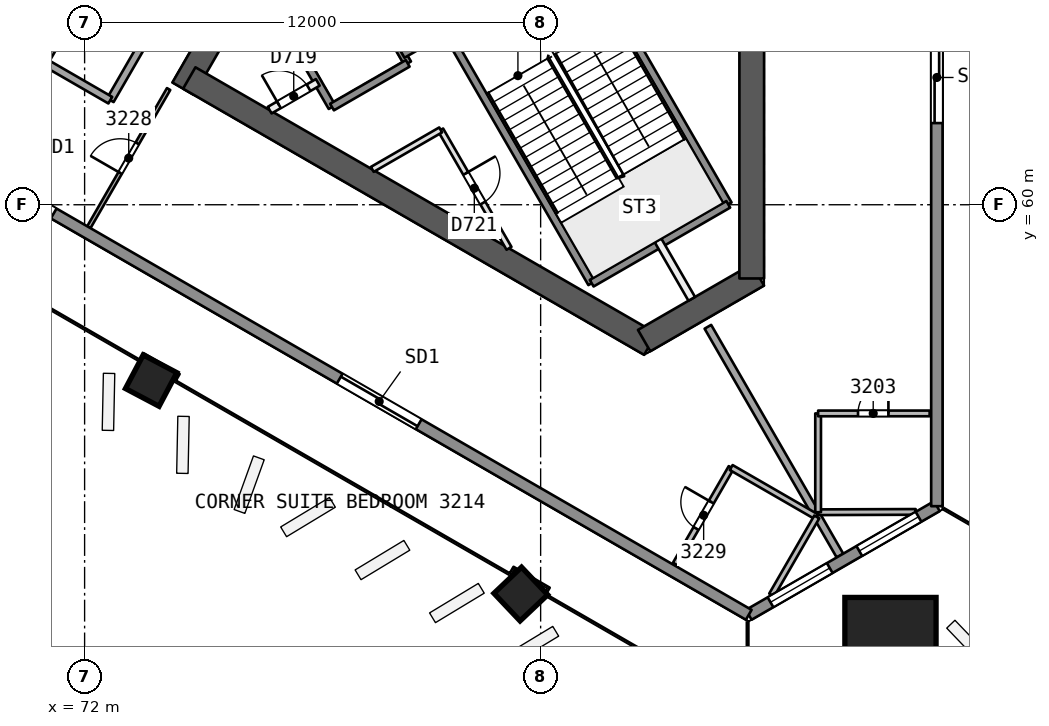
"""IFC4 building model, lengths in metres.
Left out: names, types, materials, properties, quantities, classifications, styles, units other than length and angle.
Written with IfcOpenShell. Run it as: python <this file> out.ifc"""

import sys

from ifc_helpers import new_model, si_unit, direction, frame, frame_2d, origin, origin_2d, place, context, subcontext, project, spatial, rectangle, extrude, element, fill, save


model = new_model("IFC4")
c1 = context("Model", 3, precision=1e-05, world=origin(), true_north=direction((0.0, 1.0)))
c2 = subcontext(c1, "Body", "Model", "MODEL_VIEW")
j1 = project(units=[si_unit("LENGTHUNIT", "METRE"), si_unit("PLANEANGLEUNIT", "RADIAN")], contexts=[c1])
p1 = place(None, origin())
s1 = spatial("IfcSite", under=j1, at=p1, CompositionType="ELEMENT")
p2 = place(p1, origin())
s2 = spatial("IfcBuilding", under=s1, at=p2, CompositionType="ELEMENT")
p3 = place(p2, frame((0.0, 0.0, 132.7)))
s3 = spatial("IfcBuildingStorey", under=s2, at=p3, CompositionType="ELEMENT", Elevation=132.7)
p4 = place(p3, frame((79.688, 71.881, 0.0), z_axis=(0.0, 0.0, 1.0), x_axis=(-0.49999822179, -0.866026430432, 0.0)))
e1 = element("IfcWall", 1, at=p4, inside=s3, PredefinedType="SHEAR", context=c2, shape_type="SweptSolid", body=[
    extrude(rectangle(XDim=10.192, YDim=0.65, at=frame_2d((5.096, 0.0))), origin(), (0.0, 0.0, 1.0), 3.7),
])
p5 = place(p4, frame((0.762, 0.0, 0.0)))
e2 = element("IfcOpeningElement", 2, at=p5, cuts=e1, PredefinedType="OPENING", context=c2, shape_type="SweptSolid", body=[
    extrude(rectangle(XDim=1.2, YDim=2.1, at=frame_2d((0.6, 1.05))), frame((0.0, 0.335, 0.0), z_axis=(0.0, -1.0, 0.0), x_axis=(1.0, 0.0, 0.0)), (0.0, 0.0, 1.0), 0.671),
])
p6 = place(p3, frame((74.754, 63.335, 0.0), z_axis=(0.0, 0.0, 1.0), x_axis=(0.866026250715, -0.49999853307, 0.0)))
e3 = element("IfcWall", 3, at=p6, inside=s3, PredefinedType="SHEAR", context=c2, shape_type="SweptSolid", body=[
    extrude(rectangle(XDim=14.008, YDim=0.65, at=frame_2d((7.004, 0.0))), origin(), (0.0, 0.0, 1.0), 3.7),
])
p7 = place(p3, frame((86.723, 56.425, 0.0), z_axis=(0.0, 0.0, 1.0), x_axis=(0.866031550877, 0.499989352773, 0.0)))
e4 = element("IfcWall", 4, at=p7, inside=s3, PredefinedType="SHEAR", context=c2, shape_type="SweptSolid", body=[
    extrude(rectangle(XDim=3.458, YDim=0.65, at=frame_2d((1.729, 0.0))), origin(), (0.0, 0.0, 1.0), 3.7),
])
p8 = place(p3, frame((89.555, 58.06, 0.0), z_axis=(0.0, 0.0, 1.0), x_axis=(0.0, 1.0, 0.0)))
e5 = element("IfcWall", 5, at=p8, inside=s3, PredefinedType="SHEAR", context=c2, shape_type="SweptSolid", body=[
    extrude(rectangle(XDim=14.146, YDim=0.65, at=frame_2d((7.073, 0.0))), origin(), (0.0, 0.0, 1.0), 3.7),
])
p9 = place(p3, frame((73.75, 55.345, 0.0), z_axis=(0.000857578916, 0.022824792675, 0.999739112668), x_axis=(-0.499949204908, -0.865819211891, 0.020196158824)))
e6 = element("IfcColumn", 6, at=p9, inside=s3, PredefinedType="COLUMN", context=c2, shape_type="SweptSolid", body=[
    extrude(rectangle(XDim=1.0, YDim=1.0, at=origin_2d()), origin(), (0.0, 0.0, 1.0), 3.701),
])
p10 = place(p3, frame((83.488, 49.723, 0.0), z_axis=(-0.008376454378, 0.028163354484, 0.999568237028), x_axis=(-0.500239696169, -0.865651362756, 0.020198132002)))
e7 = element("IfcColumn", 7, at=p10, inside=s3, PredefinedType="COLUMN", context=c2, shape_type="SweptSolid", body=[
    extrude(rectangle(XDim=1.0, YDim=1.0, at=origin_2d()), origin(), (0.0, 0.0, 1.0), 3.702),
])
p11 = place(p3, frame((93.227, 48.431, 0.0), z_axis=(-0.017607001884, 0.030531992032, 0.999378702468), x_axis=(0.4992500341, -0.865740835585, 0.035244986208)))
e8 = element("IfcColumn", 8, at=p11, inside=s3, PredefinedType="COLUMN", context=c2, shape_type="SweptSolid", body=[
    extrude(rectangle(XDim=2.4, YDim=2.4, at=origin_2d()), origin(), (0.0, 0.0, 1.0), 3.702),
])
p12 = place(p3, frame((93.868, 51.918, 0.0), z_axis=(0.0, 0.0, 1.0), x_axis=(-0.999994138143, -0.003423986016, 0.0)))
e9 = element("IfcWall", 9, at=p12, inside=s3, PredefinedType="PARTITIONING", context=c2, shape_type="SweptSolid", body=[
    extrude(rectangle(XDim=2.567, YDim=0.15, at=frame_2d((1.283, 0.0))), origin(), (0.0, 0.0, 1.0), 3.25),
])
p13 = place(p3, frame((91.302, 51.909, 0.0), z_axis=(0.0, 0.0, 1.0), x_axis=(0.0, 1.0, 0.0)))
e10 = element("IfcWall", 10, at=p13, inside=s3, PredefinedType="PARTITIONING", context=c2, shape_type="SweptSolid", body=[
    extrude(rectangle(XDim=2.6, YDim=0.15, at=frame_2d((1.3, 0.0))), origin(), (0.0, 0.0, 1.0), 3.25),
])
p14 = place(p3, frame((91.302, 54.509, 0.0), z_axis=(0.0, 0.0, 1.0), x_axis=(1.0, 0.0, 0.0)))
e11 = element("IfcWall", 11, at=p14, inside=s3, PredefinedType="PARTITIONING", context=c2, shape_type="SweptSolid", body=[
    extrude(rectangle(XDim=2.935, YDim=0.15, at=frame_2d((1.468, 0.0))), origin(), (0.0, 0.0, 1.0), 3.25),
])
p15 = place(p14, frame((1.05, 0.0, 0.0)))
e12 = element("IfcOpeningElement", 12, at=p15, cuts=e11, PredefinedType="OPENING", context=c2, shape_type="SweptSolid", body=[
    extrude(rectangle(XDim=0.8, YDim=2.1, at=frame_2d((0.4, 1.05))), frame((0.0, 0.085, 0.0), z_axis=(0.0, -1.0, 0.0), x_axis=(1.0, 0.0, 0.0)), (0.0, 0.0, 1.0), 0.171),
])
p16 = place(p3, frame((88.401, 56.789, 0.0), z_axis=(0.0, 0.0, 1.0), x_axis=(0.499972739829, -0.866041141879, 0.0)))
e13 = element("IfcWall", 13, at=p16, inside=s3, PredefinedType="PARTITIONING", context=c2, shape_type="SweptSolid", body=[
    extrude(rectangle(XDim=6.952, YDim=0.2, at=frame_2d((3.476, 0.0))), origin(), (0.0, 0.0, 1.0), 3.25),
])
p17 = place(p3, frame((68.331, 61.59, 0.0), z_axis=(0.0, 0.0, 1.0), x_axis=(0.499987977232, 0.866032345022, 0.0)))
e14 = element("IfcWall", 14, at=p17, inside=s3, PredefinedType="PARTITIONING", context=c2, shape_type="SweptSolid", body=[
    extrude(rectangle(XDim=12.177, YDim=0.2, at=frame_2d((6.089, 0.0))), origin(), (0.0, 0.0, 1.0), 3.25),
])
p18 = place(p3, frame((72.111, 59.408, 0.0), z_axis=(0.0, 0.0, 1.0), x_axis=(0.49999760543, 0.866026786286, 0.0)))
e15 = element("IfcWall", 15, at=p18, inside=s3, PredefinedType="PARTITIONING", context=c2, shape_type="SweptSolid", body=[
    extrude(rectangle(XDim=4.199, YDim=0.1, at=frame_2d((2.099, 0.0))), origin(), (0.0, 0.0, 1.0), 3.25),
])
p19 = place(p18, frame((1.649, 0.0, 0.0)))
e16 = element("IfcOpeningElement", 16, at=p19, cuts=e15, PredefinedType="OPENING", context=c2, shape_type="SweptSolid", body=[
    extrude(rectangle(XDim=0.9, YDim=2.1, at=frame_2d((0.45, 1.05))), frame((0.0, 0.061, 0.0), z_axis=(0.0, -1.0, 0.0), x_axis=(1.0, 0.0, 0.0)), (0.0, 0.0, 1.0), 0.121),
])
p20 = place(p3, frame((77.176, 70.545, 0.0), z_axis=(0.0, 0.0, 1.0), x_axis=(-0.499990139034, -0.866031096941, 0.0)))
e17 = element("IfcWall", 17, at=p20, inside=s3, PredefinedType="PARTITIONING", context=c2, shape_type="SweptSolid", body=[
    extrude(rectangle(XDim=9.0, YDim=0.2, at=frame_2d((4.5, 0.0))), origin(), (0.0, 0.0, 1.0), 3.25),
])
p21 = place(p20, frame((4.05, 0.0, 0.0)))
e18 = element("IfcOpeningElement", 18, at=p21, cuts=e17, PredefinedType="OPENING", context=c2, shape_type="SweptSolid", body=[
    extrude(rectangle(XDim=0.9, YDim=2.1, at=frame_2d((0.45, 1.05))), frame((0.0, 0.11, 0.0), z_axis=(0.0, -1.0, 0.0), x_axis=(1.0, 0.0, 0.0)), (0.0, 0.0, 1.0), 0.221),
])
p22 = place(p3, frame((72.676, 62.751, 0.0), z_axis=(0.0, 0.0, 1.0), x_axis=(-0.866010750942, 0.50002537861, 0.0)))
e19 = element("IfcWall", 19, at=p22, inside=s3, PredefinedType="PARTITIONING", context=c2, shape_type="SweptSolid", body=[
    extrude(rectangle(XDim=2.0, YDim=0.2, at=frame_2d((1.0, 0.0))), origin(), (0.0, 0.0, 1.0), 3.25),
])
p23 = place(p3, frame((70.944, 63.751, 0.0), z_axis=(0.0, 0.0, 1.0), x_axis=(0.499990139034, 0.866031096941, 0.0)))
e20 = element("IfcWall", 20, at=p23, inside=s3, PredefinedType="PARTITIONING", context=c2, shape_type="SweptSolid", body=[
    extrude(rectangle(XDim=9.0, YDim=0.2, at=frame_2d((4.5, 0.0))), origin(), (0.0, 0.0, 1.0), 3.25),
])
p24 = place(p3, frame((87.547, 50.543, 0.0), z_axis=(0.0, 0.0, 1.0), x_axis=(0.499976855651, 0.866038765768, 0.0)))
e21 = element("IfcWall", 21, at=p24, inside=s3, PredefinedType="PARTITIONING", context=c2, shape_type="SweptSolid", body=[
    extrude(rectangle(XDim=2.935, YDim=0.15, at=frame_2d((1.468, 0.0))), origin(), (0.0, 0.0, 1.0), 3.25),
])
p25 = place(p24, frame((1.085, 0.0, 0.0)))
e22 = element("IfcOpeningElement", 22, at=p25, cuts=e21, PredefinedType="OPENING", context=c2, shape_type="SweptSolid", body=[
    extrude(rectangle(XDim=0.8, YDim=2.1, at=frame_2d((0.4, 1.05))), frame((0.0, 0.085, 0.0), z_axis=(0.0, -1.0, 0.0), x_axis=(1.0, 0.0, 0.0)), (0.0, 0.0, 1.0), 0.171),
])
p26 = place(p3, frame((89.014, 53.085, 0.0), z_axis=(0.0, 0.0, 1.0), x_axis=(0.866021400173, -0.500006934395, 0.0)))
e23 = element("IfcWall", 23, at=p26, inside=s3, PredefinedType="PARTITIONING", context=c2, shape_type="SweptSolid", body=[
    extrude(rectangle(XDim=2.6, YDim=0.15, at=frame_2d((1.3, 0.0))), origin(), (0.0, 0.0, 1.0), 3.25),
])
p27 = place(p3, frame((91.266, 51.785, 0.0), z_axis=(0.0, 0.0, 1.0), x_axis=(-0.49995699919, -0.866050228891, 0.0)))
e24 = element("IfcWall", 24, at=p27, inside=s3, PredefinedType="PARTITIONING", context=c2, shape_type="SweptSolid", body=[
    extrude(rectangle(XDim=2.373, YDim=0.15, at=frame_2d((1.187, 0.0))), origin(), (0.0, 0.0, 1.0), 3.25),
])
p28 = place(p3, frame((94.427, 52.068, 0.0), z_axis=(0.0, 0.0, 1.0), x_axis=(-0.866021273833, -0.500007153218, 0.0)))
e25 = element("IfcWall", 25, at=p28, inside=s3, PredefinedType="SOLIDWALL", context=c2, shape_type="SweptSolid", body=[
    extrude(rectangle(XDim=5.716, YDim=0.3, at=frame_2d((2.858, 0.0))), origin(), (0.0, 0.0, 1.0), 3.25),
])
p29 = place(p28, frame((0.557, 0.0, 0.9)))
e26 = element("IfcOpeningElement", 26, at=p29, cuts=e25, PredefinedType="OPENING", context=c2, shape_type="SweptSolid", body=[
    extrude(rectangle(XDim=1.8, YDim=1.5, at=frame_2d((0.9, 0.75))), frame((0.0, 0.161, 0.0), z_axis=(0.0, -1.0, 0.0), x_axis=(1.0, 0.0, 0.0)), (0.0, 0.0, 1.0), 0.321),
])
p30 = place(p28, frame((3.255, 0.0, 0.9)))
e27 = element("IfcOpeningElement", 27, at=p30, cuts=e25, PredefinedType="OPENING", context=c2, shape_type="SweptSolid", body=[
    extrude(rectangle(XDim=1.8, YDim=1.5, at=frame_2d((0.9, 0.75))), frame((0.0, 0.161, 0.0), z_axis=(0.0, -1.0, 0.0), x_axis=(1.0, 0.0, 0.0)), (0.0, 0.0, 1.0), 0.321),
])
p31 = place(p3, frame((94.427, 107.932, 0.0), z_axis=(0.0, 0.0, 1.0), x_axis=(0.0, -1.0, 0.0)))
e28 = element("IfcWall", 28, at=p31, inside=s3, PredefinedType="SOLIDWALL", context=c2, shape_type="SweptSolid", body=[
    extrude(rectangle(XDim=55.864, YDim=0.3, at=frame_2d((27.932, 0.0))), origin(), (0.0, 0.0, 1.0), 3.25),
])
p32 = place(p31, frame((31.72, 0.0, 0.0)))
e29 = element("IfcOpeningElement", 29, at=p32, cuts=e28, PredefinedType="OPENING", context=c2, shape_type="SweptSolid", body=[
    extrude(rectangle(XDim=2.4, YDim=2.4, at=frame_2d((1.2, 1.2))), frame((0.0, 0.161, 0.0), z_axis=(0.0, -1.0, 0.0), x_axis=(1.0, 0.0, 0.0)), (0.0, 0.0, 1.0), 0.321),
])
p33 = place(p31, frame((43.384, 0.0, 0.0)))
e30 = element("IfcOpeningElement", 30, at=p33, cuts=e28, PredefinedType="OPENING", context=c2, shape_type="SweptSolid", body=[
    extrude(rectangle(XDim=2.4, YDim=2.4, at=frame_2d((1.2, 1.2))), frame((0.0, 0.161, 0.0), z_axis=(0.0, -1.0, 0.0), x_axis=(1.0, 0.0, 0.0)), (0.0, 0.0, 1.0), 0.321),
])
p34 = place(p31, frame((21.9, 0.0, 0.0)))
e31 = element("IfcOpeningElement", 31, at=p34, cuts=e28, PredefinedType="OPENING", context=c2, shape_type="SweptSolid", body=[
    extrude(rectangle(XDim=2.4, YDim=2.4, at=frame_2d((1.2, 1.2))), frame((0.0, 0.161, 0.0), z_axis=(0.0, -1.0, 0.0), x_axis=(1.0, 0.0, 0.0)), (0.0, 0.0, 1.0), 0.321),
])
p35 = place(p31, frame((10.029, 0.0, 0.0)))
e32 = element("IfcOpeningElement", 32, at=p35, cuts=e28, PredefinedType="OPENING", context=c2, shape_type="SweptSolid", body=[
    extrude(rectangle(XDim=2.4, YDim=2.4, at=frame_2d((1.2, 1.2))), frame((0.0, 0.161, 0.0), z_axis=(0.0, -1.0, 0.0), x_axis=(1.0, 0.0, 0.0)), (0.0, 0.0, 1.0), 0.321),
])
p36 = place(p31, frame((26.888, 0.0, 0.0)))
e33 = element("IfcOpeningElement", 33, at=p36, cuts=e28, PredefinedType="OPENING", context=c2, shape_type="SweptSolid", body=[
    extrude(rectangle(XDim=2.4, YDim=2.4, at=frame_2d((1.2, 1.2))), frame((0.0, 0.161, 0.0), z_axis=(0.0, -1.0, 0.0), x_axis=(1.0, 0.0, 0.0)), (0.0, 0.0, 1.0), 0.321),
])
p37 = place(p3, frame((89.477, 49.21, 0.0), z_axis=(0.0, 0.0, 1.0), x_axis=(-0.866026276916, 0.499998487688, 0.0)))
e34 = element("IfcWall", 34, at=p37, inside=s3, PredefinedType="SOLIDWALL", context=c2, shape_type="SweptSolid", body=[
    extrude(rectangle(XDim=55.864, YDim=0.3, at=frame_2d((27.932, 0.0))), origin(), (0.0, 0.0, 1.0), 3.25),
])
p38 = place(p37, frame((26.888, 0.0, 0.0)))
e35 = element("IfcOpeningElement", 35, at=p38, cuts=e34, PredefinedType="OPENING", context=c2, shape_type="SweptSolid", body=[
    extrude(rectangle(XDim=2.4, YDim=2.4, at=frame_2d((1.2, 1.2))), frame((0.0, 0.161, 0.0), z_axis=(0.0, -1.0, 0.0), x_axis=(1.0, 0.0, 0.0)), (0.0, 0.0, 1.0), 0.321),
])
p39 = place(p37, frame((32.5, 0.0, 0.0)))
e36 = element("IfcOpeningElement", 36, at=p39, cuts=e34, PredefinedType="OPENING", context=c2, shape_type="SweptSolid", body=[
    extrude(rectangle(XDim=2.4, YDim=2.4, at=frame_2d((1.2, 1.2))), frame((0.0, 0.161, 0.0), z_axis=(0.0, -1.0, 0.0), x_axis=(1.0, 0.0, 0.0)), (0.0, 0.0, 1.0), 0.321),
])
p40 = place(p37, frame((43.384, 0.0, 0.0)))
e37 = element("IfcOpeningElement", 37, at=p40, cuts=e34, PredefinedType="OPENING", context=c2, shape_type="SweptSolid", body=[
    extrude(rectangle(XDim=2.4, YDim=2.4, at=frame_2d((1.2, 1.2))), frame((0.0, 0.161, 0.0), z_axis=(0.0, -1.0, 0.0), x_axis=(1.0, 0.0, 0.0)), (0.0, 0.0, 1.0), 0.321),
])
p41 = place(p37, frame((21.12, 0.0, 0.0)))
e38 = element("IfcOpeningElement", 38, at=p41, cuts=e34, PredefinedType="OPENING", context=c2, shape_type="SweptSolid", body=[
    extrude(rectangle(XDim=2.4, YDim=2.4, at=frame_2d((1.2, 1.2))), frame((0.0, 0.161, 0.0), z_axis=(0.0, -1.0, 0.0), x_axis=(1.0, 0.0, 0.0)), (0.0, 0.0, 1.0), 0.321),
])
p42 = place(p37, frame((10.029, 0.0, 0.0)))
e39 = element("IfcOpeningElement", 39, at=p42, cuts=e34, PredefinedType="OPENING", context=c2, shape_type="SweptSolid", body=[
    extrude(rectangle(XDim=2.4, YDim=2.4, at=frame_2d((1.2, 1.2))), frame((0.0, 0.161, 0.0), z_axis=(0.0, -1.0, 0.0), x_axis=(1.0, 0.0, 0.0)), (0.0, 0.0, 1.0), 0.321),
])
p43 = place(p3, frame((77.135, 64.952, 0.0), z_axis=(0.0, 0.0, 1.0), x_axis=(0.499996545922, -0.866027397988, 0.0)))
e40 = element("IfcWall", 40, at=p43, inside=s3, PredefinedType="SOLIDWALL", context=c2, shape_type="SweptSolid", body=[
    extrude(rectangle(XDim=2.75, YDim=0.2, at=frame_2d((1.375, 0.0))), origin(), (0.0, 0.0, 1.0), 3.25),
])
p44 = place(p3, frame((81.369, 61.969, 0.0), z_axis=(0.0, 0.0, 1.0), x_axis=(0.499992664208, -0.866029639064, 0.0)))
e41 = element("IfcWall", 41, at=p44, inside=s3, PredefinedType="PARTITIONING", context=c2, shape_type="SweptSolid", body=[
    extrude(rectangle(XDim=3.598, YDim=0.15, at=frame_2d((1.799, 0.0))), origin(), (0.0, 0.0, 1.0), 3.25),
])
p45 = place(p44, frame((1.322, 0.0, 0.0)))
e42 = element("IfcOpeningElement", 42, at=p45, cuts=e41, PredefinedType="OPENING", context=c2, shape_type="SweptSolid", body=[
    extrude(rectangle(XDim=0.9, YDim=2.1, at=frame_2d((0.45, 1.05))), frame((0.0, 0.085, 0.0), z_axis=(0.0, -1.0, 0.0), x_axis=(1.0, 0.0, 0.0)), (0.0, 0.0, 1.0), 0.171),
])
p46 = place(p3, frame((79.127, 66.102, 0.0), z_axis=(0.0, 0.0, 1.0), x_axis=(0.499996545922, -0.866027397988, 0.0)))
e43 = element("IfcWall", 43, at=p46, inside=s3, PredefinedType="SOLIDWALL", context=c2, shape_type="SweptSolid", body=[
    extrude(rectangle(XDim=2.75, YDim=0.2, at=frame_2d((1.375, 0.0))), origin(), (0.0, 0.0, 1.0), 3.25),
])
p47 = place(p3, frame((81.493, 64.604, 0.0), z_axis=(0.0, 0.0, 1.0), x_axis=(0.500006057782, -0.866021906294, 0.0)))
e44 = element("IfcWall", 44, at=p47, inside=s3, PredefinedType="SOLIDWALL", context=c2, shape_type="SweptSolid", body=[
    extrude(rectangle(XDim=7.7, YDim=0.2, at=frame_2d((3.85, 0.0))), origin(), (0.0, 0.0, 1.0), 3.25),
])
p48 = place(p3, frame((87.09, 59.06, 0.0), z_axis=(0.0, 0.0, 1.0), x_axis=(0.499944938281, -0.866057191349, 0.0)))
e45 = element("IfcWall", 45, at=p48, inside=s3, PredefinedType="PARTITIONING", context=c2, shape_type="SweptSolid", body=[
    extrude(rectangle(XDim=1.773, YDim=0.2, at=frame_2d((0.887, 0.0))), origin(), (0.0, 0.0, 1.0), 3.25),
])
p49 = place(p3, frame((85.087, 66.679, 0.0), z_axis=(0.0, 0.0, 1.0), x_axis=(0.500019787375, -0.866013979237, 0.0)))
e46 = element("IfcWall", 46, at=p49, inside=s3, PredefinedType="SOLIDWALL", context=c2, shape_type="SweptSolid", body=[
    extrude(rectangle(XDim=7.7, YDim=0.2, at=frame_2d((3.85, 0.0))), origin(), (0.0, 0.0, 1.0), 3.25),
])
p50 = place(p49, frame((0.55, 0.0, 0.0)))
e47 = element("IfcOpeningElement", 47, at=p50, cuts=e46, PredefinedType="OPENING", context=c2, shape_type="SweptSolid", body=[
    extrude(rectangle(XDim=1.1, YDim=2.1, at=frame_2d((0.55, 1.05))), frame((0.0, 0.11, 0.0), z_axis=(0.0, -1.0, 0.0), x_axis=(1.0, 0.0, 0.0)), (0.0, 0.0, 1.0), 0.221),
])
p51 = place(p3, frame((76.87, 62.489, 0.0), z_axis=(0.0, 0.0, 1.0), x_axis=(0.866054810376, 0.49994906283, 0.0)))
e48 = element("IfcWall", 48, at=p51, inside=s3, PredefinedType="PARTITIONING", context=c2, shape_type="SweptSolid", body=[
    extrude(rectangle(XDim=1.461, YDim=0.2, at=frame_2d((0.73, 0.0))), origin(), (0.0, 0.0, 1.0), 3.25),
])
p52 = place(p51, frame((0.281, 0.0, 0.0)))
e49 = element("IfcOpeningElement", 49, at=p52, cuts=e48, PredefinedType="OPENING", context=c2, shape_type="SweptSolid", body=[
    extrude(rectangle(XDim=0.9, YDim=2.1, at=frame_2d((0.45, 1.05))), frame((0.0, 0.11, 0.0), z_axis=(0.0, -1.0, 0.0), x_axis=(1.0, 0.0, 0.0)), (0.0, 0.0, 1.0), 0.221),
])
p53 = place(p3, frame((80.367, 63.954, 0.0), z_axis=(0.0, 0.0, 1.0), x_axis=(0.866026575979, 0.499997969693, 0.0)))
e50 = element("IfcWall", 50, at=p53, inside=s3, PredefinedType="SOLIDWALL", context=c2, shape_type="SweptSolid", body=[
    extrude(rectangle(XDim=6.75, YDim=0.2, at=frame_2d((3.375, 0.0))), origin(), (0.0, 0.0, 1.0), 3.25),
])
p54 = place(p3, frame((78.51, 62.57, 0.0), z_axis=(0.0, 0.0, 1.0), x_axis=(0.866053019151, 0.499952165731, 0.0)))
e51 = element("IfcWall", 51, at=p54, inside=s3, PredefinedType="SOLIDWALL", context=c2, shape_type="SweptSolid", body=[
    extrude(rectangle(XDim=2.3, YDim=0.2, at=frame_2d((1.15, 0.0))), origin(), (0.0, 0.0, 1.0), 3.25),
])
p55 = place(p3, frame((79.57, 60.93, 0.0), z_axis=(0.0, 0.0, 1.0), x_axis=(0.866021168401, 0.500007335828, 0.0)))
e52 = element("IfcWall", 52, at=p55, inside=s3, PredefinedType="PARTITIONING", context=c2, shape_type="SweptSolid", body=[
    extrude(rectangle(XDim=2.077, YDim=0.15, at=frame_2d((1.039, 0.0))), origin(), (0.0, 0.0, 1.0), 3.25),
])
p56 = place(p3, frame((85.343, 57.935, 0.0), z_axis=(0.0, 0.0, 1.0), x_axis=(0.866004344652, 0.500036473714, 0.0)))
e53 = element("IfcWall", 53, at=p56, inside=s3, PredefinedType="SOLIDWALL", context=c2, shape_type="SweptSolid", body=[
    extrude(rectangle(XDim=4.15, YDim=0.2, at=frame_2d((2.075, 0.0))), origin(), (0.0, 0.0, 1.0), 3.25),
])
p57 = place(p15, origin())
e54 = element("IfcDoor", 54, at=p57, inside=s3, OperationType="SINGLE_SWING_RIGHT", PredefinedType="NOTDEFINED", context=c2, shape_type="SweptSolid", body=[
    extrude(rectangle(XDim=0.8, YDim=2.1, at=frame_2d((0.4, 1.05))), frame((0.0, 0.025, 0.0), z_axis=(0.0, -1.0, 0.0), x_axis=(1.0, 0.0, 0.0)), (0.0, 0.0, 1.0), 0.05),
])
fill(e12, e54)
p58 = place(p19, origin())
e55 = element("IfcDoor", 55, at=p58, inside=s3, OperationType="SINGLE_SWING_LEFT", PredefinedType="NOTDEFINED", context=c2, shape_type="SweptSolid", body=[
    extrude(rectangle(XDim=0.9, YDim=2.1, at=frame_2d((0.45, 1.05))), frame((0.0, 0.025, 0.0), z_axis=(0.0, -1.0, 0.0), x_axis=(1.0, 0.0, 0.0)), (0.0, 0.0, 1.0), 0.05),
])
fill(e16, e55)
p59 = place(p25, origin())
e56 = element("IfcDoor", 56, at=p59, inside=s3, OperationType="SINGLE_SWING_RIGHT", PredefinedType="NOTDEFINED", context=c2, shape_type="SweptSolid", body=[
    extrude(rectangle(XDim=0.8, YDim=2.1, at=frame_2d((0.4, 1.05))), frame((0.0, 0.025, 0.0), z_axis=(0.0, -1.0, 0.0), x_axis=(1.0, 0.0, 0.0)), (0.0, 0.0, 1.0), 0.05),
])
fill(e22, e56)
p60 = place(p29, origin())
e57 = element("IfcWindow", 57, at=p60, inside=s3, PartitioningType="SINGLE_PANEL", PredefinedType="WINDOW", context=c2, shape_type="SweptSolid", body=[
    extrude(rectangle(XDim=1.8, YDim=1.5, at=frame_2d((0.9, 0.75))), frame((0.0, 0.03, 0.0), z_axis=(0.0, -1.0, 0.0), x_axis=(1.0, 0.0, 0.0)), (0.0, 0.0, 1.0), 0.06),
])
fill(e26, e57)
p61 = place(p30, origin())
e58 = element("IfcWindow", 58, at=p61, inside=s3, PartitioningType="SINGLE_PANEL", PredefinedType="WINDOW", context=c2, shape_type="SweptSolid", body=[
    extrude(rectangle(XDim=1.8, YDim=1.5, at=frame_2d((0.9, 0.75))), frame((0.0, 0.03, 0.0), z_axis=(0.0, -1.0, 0.0), x_axis=(1.0, 0.0, 0.0)), (0.0, 0.0, 1.0), 0.06),
])
fill(e27, e58)
p62 = place(p33, origin())
e59 = element("IfcDoor", 59, at=p62, inside=s3, OperationType="SLIDING_TO_RIGHT", PredefinedType="NOTDEFINED", context=c2, shape_type="SweptSolid", body=[
    extrude(rectangle(XDim=2.4, YDim=2.4, at=frame_2d((1.2, 1.2))), frame((0.0, 0.025, 0.0), z_axis=(0.0, -1.0, 0.0), x_axis=(1.0, 0.0, 0.0)), (0.0, 0.0, 1.0), 0.05),
])
fill(e30, e59)
p63 = place(p41, origin())
e60 = element("IfcDoor", 60, at=p63, inside=s3, OperationType="SLIDING_TO_RIGHT", PredefinedType="NOTDEFINED", context=c2, shape_type="SweptSolid", body=[
    extrude(rectangle(XDim=2.4, YDim=2.4, at=frame_2d((1.2, 1.2))), frame((0.0, 0.025, 0.0), z_axis=(0.0, -1.0, 0.0), x_axis=(1.0, 0.0, 0.0)), (0.0, 0.0, 1.0), 0.05),
])
fill(e38, e60)
p64 = place(p42, origin())
e61 = element("IfcDoor", 61, at=p64, inside=s3, OperationType="SLIDING_TO_LEFT", PredefinedType="NOTDEFINED", context=c2, shape_type="SweptSolid", body=[
    extrude(rectangle(XDim=2.4, YDim=2.4, at=frame_2d((1.2, 1.2))), frame((0.0, 0.025, 0.0), z_axis=(0.0, -1.0, 0.0), x_axis=(1.0, 0.0, 0.0)), (0.0, 0.0, 1.0), 0.05),
])
fill(e39, e61)
p65 = place(p52, origin())
e62 = element("IfcDoor", 62, at=p65, inside=s3, OperationType="SINGLE_SWING_LEFT", PredefinedType="NOTDEFINED", context=c2, shape_type="SweptSolid", body=[
    extrude(rectangle(XDim=0.9, YDim=2.1, at=frame_2d((0.45, 1.05))), frame((0.0, 0.025, 0.0), z_axis=(0.0, -1.0, 0.0), x_axis=(1.0, 0.0, 0.0)), (0.0, 0.0, 1.0), 0.05),
])
fill(e49, e62)
p66 = place(p45, origin())
e63 = element("IfcDoor", 63, at=p66, inside=s3, OperationType="SINGLE_SWING_LEFT", PredefinedType="NOTDEFINED", context=c2, shape_type="SweptSolid", body=[
    extrude(rectangle(XDim=0.9, YDim=2.1, at=frame_2d((0.45, 1.05))), frame((0.0, 0.025, 0.0), z_axis=(0.0, -1.0, 0.0), x_axis=(1.0, 0.0, 0.0)), (0.0, 0.0, 1.0), 0.05),
])
fill(e42, e63)
save(model, sys.argv[1])
